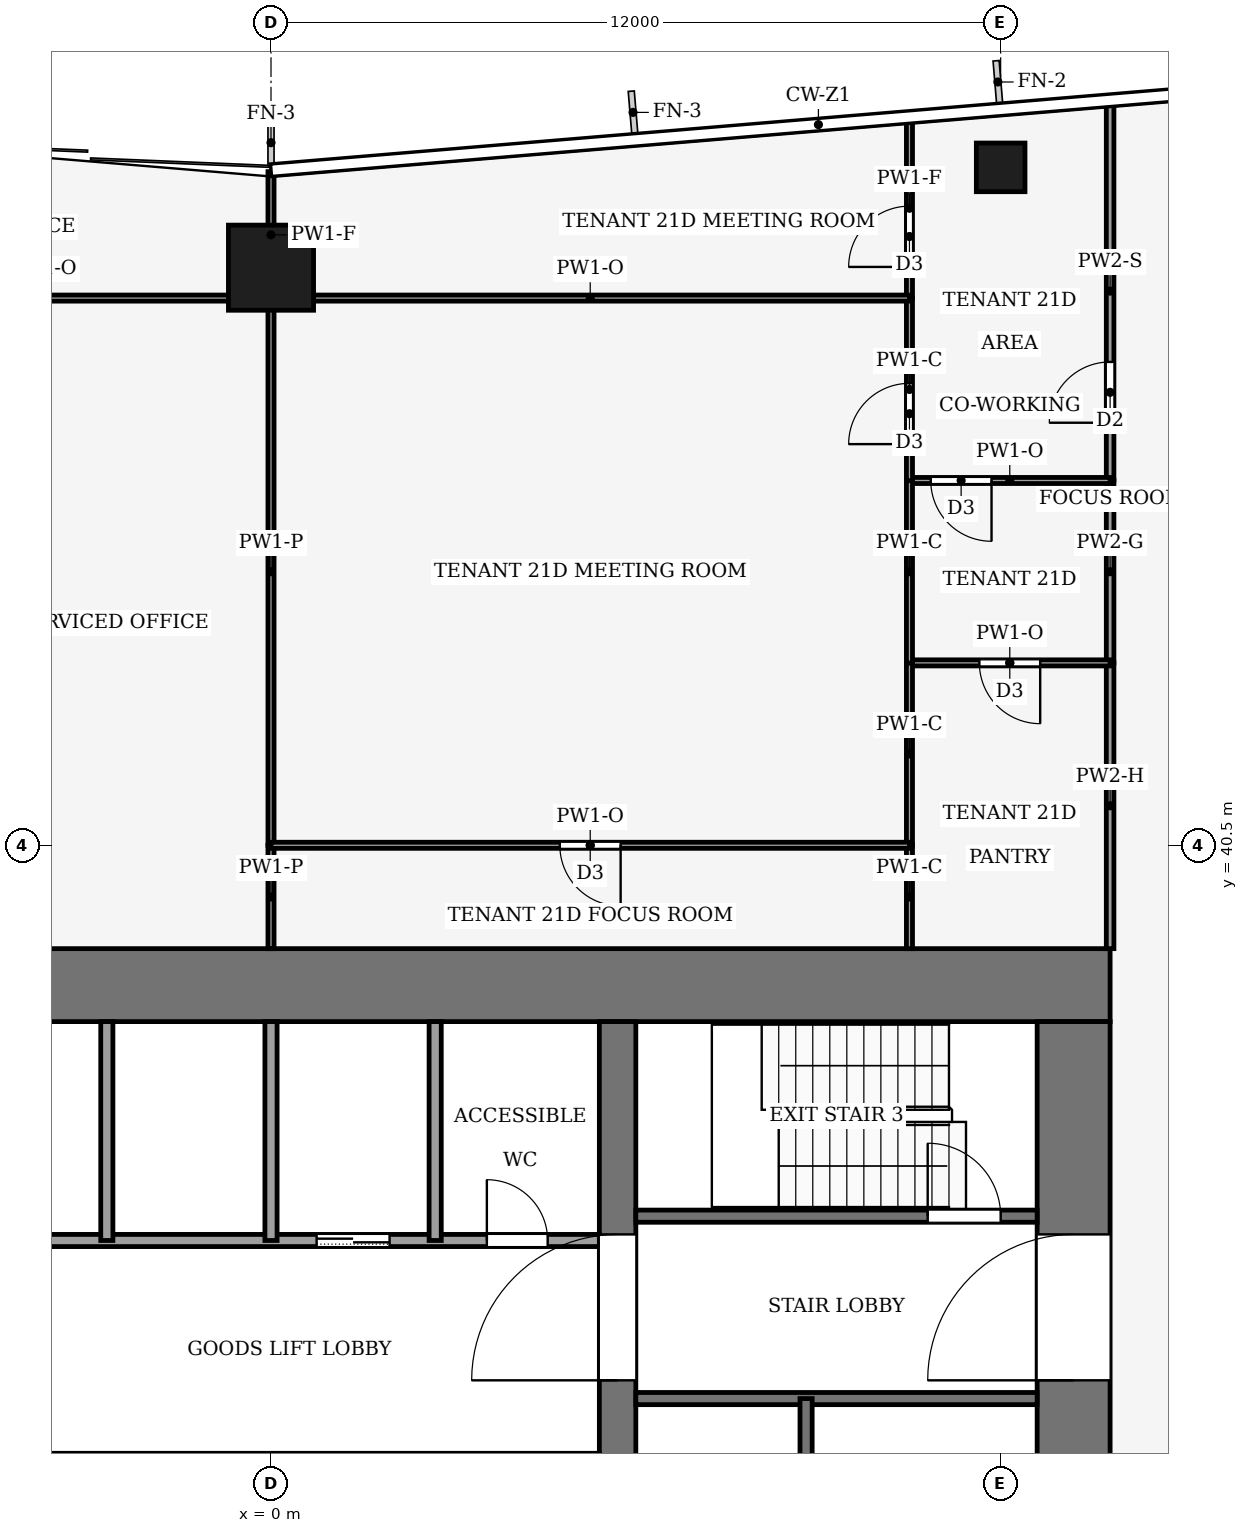
"""IFC4 building model, lengths in metres.
Left out: names, types, materials, properties, quantities, classifications, styles, units other than length and angle.
Written with IfcOpenShell. Run it as: python <this file> out.ifc"""

import sys

from ifc_helpers import new_model, si_unit, direction, frame, frame_2d, origin, origin_2d, place, context, subcontext, project, spatial, rectangle, hollow_rectangle, extrude, element, fill, save


model = new_model("IFC4")
c1 = context("Model", 3, precision=1e-05, world=origin(), true_north=direction((0.0, 1.0)))
c2 = subcontext(c1, "Body", "Model", "MODEL_VIEW")
j1 = project(units=[si_unit("LENGTHUNIT", "METRE"), si_unit("PLANEANGLEUNIT", "RADIAN")], contexts=[c1])
p1 = place(None, origin())
s1 = spatial("IfcSite", under=j1, at=p1, CompositionType="ELEMENT")
p2 = place(p1, origin())
s2 = spatial("IfcBuilding", under=s1, at=p2, CompositionType="ELEMENT")
p3 = place(p2, frame((0.0, 0.0, 94.0)))
s3 = spatial("IfcBuildingStorey", under=s2, at=p3, CompositionType="ELEMENT", Elevation=94.0)
p4 = place(p3, frame((-13.8, 38.2, -0.13), z_axis=(0.0, 0.0, 1.0), x_axis=(1.0, 0.0, 0.0)))
e1 = element("IfcWall", 1, at=p4, inside=s3, PredefinedType="SHEAR", context=c2, shape_type="SweptSolid", body=[
    extrude(rectangle(XDim=27.6, YDim=1.2, at=frame_2d((13.8, 0.0))), origin(), (0.0, 0.0, 1.0), 4.0),
])
p5 = place(p3, frame((13.2, 18.4, -0.13), z_axis=(0.0, 0.0, 1.0), x_axis=(0.0, 1.0, 0.0)))
e2 = element("IfcWall", 2, at=p5, inside=s3, PredefinedType="SHEAR", context=c2, shape_type="SweptSolid", body=[
    extrude(rectangle(XDim=19.2, YDim=1.2, at=frame_2d((9.6, 0.0))), origin(), (0.0, 0.0, 1.0), 4.0),
])
p6 = place(p5, frame((2.8, 0.0, 0.13)))
e3 = element("IfcOpeningElement", 3, at=p6, cuts=e2, PredefinedType="OPENING", context=c2, shape_type="SweptSolid", body=[
    extrude(rectangle(XDim=2.4, YDim=2.4, at=frame_2d((1.2, 1.2))), frame((0.0, 0.61, 0.0), z_axis=(0.0, -1.0, 0.0), x_axis=(1.0, 0.0, 0.0)), (0.0, 0.0, 1.0), 1.22),
])
p7 = place(p5, frame((13.3, 0.0, 0.13)))
e4 = element("IfcOpeningElement", 4, at=p7, cuts=e2, PredefinedType="OPENING", context=c2, shape_type="SweptSolid", body=[
    extrude(rectangle(XDim=2.4, YDim=2.4, at=frame_2d((1.2, 1.2))), frame((0.0, 0.61, 0.0), z_axis=(0.0, -1.0, 0.0), x_axis=(1.0, 0.0, 0.0)), (0.0, 0.0, 1.0), 1.22),
])
p8 = place(p3, frame((5.7, 18.4, -0.13), z_axis=(0.0, 0.0, 1.0), x_axis=(0.0, 1.0, 0.0)))
e5 = element("IfcWall", 5, at=p8, inside=s3, PredefinedType="SHEAR", context=c2, shape_type="SweptSolid", body=[
    extrude(rectangle(XDim=19.2, YDim=0.6, at=frame_2d((9.6, 0.0))), origin(), (0.0, 0.0, 1.0), 4.0),
])
p9 = place(p8, frame((8.35, 0.0, 0.13)))
e6 = element("IfcOpeningElement", 6, at=p9, cuts=e5, PredefinedType="OPENING", context=c2, shape_type="SweptSolid", body=[
    extrude(rectangle(XDim=0.9, YDim=2.1, at=frame_2d((0.45, 1.05))), frame((0.0, 0.31, 0.0), z_axis=(0.0, -1.0, 0.0), x_axis=(1.0, 0.0, 0.0)), (0.0, 0.0, 1.0), 0.62),
])
p10 = place(p8, frame((13.3, 0.0, 0.13)))
e7 = element("IfcOpeningElement", 7, at=p10, cuts=e5, PredefinedType="OPENING", context=c2, shape_type="SweptSolid", body=[
    extrude(rectangle(XDim=2.4, YDim=2.4, at=frame_2d((1.2, 1.2))), frame((0.0, 0.31, 0.0), z_axis=(0.0, -1.0, 0.0), x_axis=(1.0, 0.0, 0.0)), (0.0, 0.0, 1.0), 0.62),
])
p11 = place(p3, frame((0.0, 50.0, 0.0), z_axis=(0.0, 0.0, 1.0), x_axis=(1.0, 0.0, 0.0)))
e8 = element("IfcColumn", 8, at=p11, inside=s3, PredefinedType="COLUMN", context=c2, shape_type="SweptSolid", body=[
    extrude(hollow_rectangle(XDim=1.4, YDim=1.4, WallThickness=0.08, at=origin_2d()), origin(), (0.0, 0.0, 1.0), 4.0),
])
p12 = place(p3, frame((12.0, 51.65, 0.0), z_axis=(0.0, 0.0, 1.0), x_axis=(1.0, 0.0, 0.0)))
e9 = element("IfcColumn", 9, at=p12, inside=s3, PredefinedType="COLUMN", context=c2, shape_type="SweptSolid", body=[
    extrude(hollow_rectangle(XDim=0.8, YDim=0.8, WallThickness=0.04, at=origin_2d()), origin(), (0.0, 0.0, 1.0), 4.0),
])
p13 = place(p3, frame((6.0, 31.4, 0.0), z_axis=(0.0, 0.0, 1.0), x_axis=(1.0, 0.0, 0.0)))
e10 = element("IfcWall", 10, at=p13, inside=s3, PredefinedType="PARTITIONING", context=c2, shape_type="SweptSolid", body=[
    extrude(rectangle(XDim=6.6, YDim=0.2, at=frame_2d((3.3, 0.0))), origin(), (0.0, 0.0, 1.0), 3.87),
])
p14 = place(p3, frame((-5.4, 34.0, 0.0), z_axis=(0.0, 0.0, 1.0), x_axis=(1.0, 0.0, 0.0)))
e11 = element("IfcWall", 11, at=p14, inside=s3, PredefinedType="PARTITIONING", context=c2, shape_type="SweptSolid", body=[
    extrude(rectangle(XDim=10.8, YDim=0.2, at=frame_2d((5.4, 0.0))), origin(), (0.0, 0.0, 1.0), 3.87),
])
p15 = place(p14, frame((6.15, 0.0, 0.0)))
e12 = element("IfcOpeningElement", 12, at=p15, cuts=e11, PredefinedType="OPENING", context=c2, shape_type="SweptSolid", body=[
    extrude(rectangle(XDim=1.2, YDim=2.2, at=frame_2d((0.6, 1.1))), frame((0.0, 0.11, 0.0), z_axis=(0.0, -1.0, 0.0), x_axis=(1.0, 0.0, 0.0)), (0.0, 0.0, 1.0), 0.22),
])
p16 = place(p14, frame((8.95, 0.0, 0.0)))
e13 = element("IfcOpeningElement", 13, at=p16, cuts=e11, PredefinedType="OPENING", context=c2, shape_type="SweptSolid", body=[
    extrude(rectangle(XDim=1.0, YDim=2.1, at=frame_2d((0.5, 1.05))), frame((0.0, 0.11, 0.0), z_axis=(0.0, -1.0, 0.0), x_axis=(1.0, 0.0, 0.0)), (0.0, 0.0, 1.0), 0.22),
])
p17 = place(p3, frame((6.0, 34.4, 0.0), z_axis=(0.0, 0.0, 1.0), x_axis=(1.0, 0.0, 0.0)))
e14 = element("IfcWall", 14, at=p17, inside=s3, PredefinedType="PARTITIONING", context=c2, shape_type="SweptSolid", body=[
    extrude(rectangle(XDim=6.6, YDim=0.2, at=frame_2d((3.3, 0.0))), origin(), (0.0, 0.0, 1.0), 3.87),
])
p18 = place(p17, frame((4.8, 0.0, 0.0)))
e15 = element("IfcOpeningElement", 15, at=p18, cuts=e14, PredefinedType="OPENING", context=c2, shape_type="SweptSolid", body=[
    extrude(rectangle(XDim=1.2, YDim=2.2, at=frame_2d((0.6, 1.1))), frame((0.0, 0.11, 0.0), z_axis=(0.0, -1.0, 0.0), x_axis=(1.0, 0.0, 0.0)), (0.0, 0.0, 1.0), 0.22),
])
for number, where, z_axis, x_axis in (
    (16, (-2.7, 34.0, 0.0), (0.0, 0.0, 1.0), (0.0, 1.0, 0.0)),
    (17, (0.0, 34.0, 0.0), (0.0, 0.0, 1.0), (0.0, 1.0, 0.0)),
    (18, (2.7, 34.0, 0.0), (0.0, 0.0, 1.0), (0.0, 1.0, 0.0)),
):
    element("IfcWall", number, at=place(p3, frame(where, z_axis=z_axis, x_axis=x_axis)), inside=s3, PredefinedType="PARTITIONING", context=c2, shape_type="SweptSolid", body=[
        extrude(rectangle(XDim=3.6, YDim=0.2, at=frame_2d((1.8, 0.0))), origin(), (0.0, 0.0, 1.0), 3.87),
    ])
p19 = place(p3, frame((8.8, 24.0, 0.0), z_axis=(0.0, 0.0, 1.0), x_axis=(0.0, 1.0, 0.0)))
e19 = element("IfcWall", 19, at=p19, inside=s3, PredefinedType="PARTITIONING", context=c2, shape_type="SweptSolid", body=[
    extrude(rectangle(XDim=7.4, YDim=0.2, at=frame_2d((3.7, 0.0))), origin(), (0.0, 0.0, 1.0), 3.87),
])
p20 = place(p3, frame((13.8, 43.5, 0.0), z_axis=(0.0, 0.0, 1.0), x_axis=(0.0, -1.0, 0.0)))
e20 = element("IfcWall", 20, at=p20, inside=s3, PredefinedType="PARTITIONING", context=c2, shape_type="SweptSolid", body=[
    extrude(rectangle(XDim=4.7, YDim=0.125, at=frame_2d((2.35, 0.0))), origin(), (0.0, 0.0, 1.0), 3.14),
])
p21 = place(p3, frame((13.8, 46.5, 0.0), z_axis=(0.0, 0.0, 1.0), x_axis=(0.0, -1.0, 0.0)))
e21 = element("IfcWall", 21, at=p21, inside=s3, PredefinedType="PARTITIONING", context=c2, shape_type="SweptSolid", body=[
    extrude(rectangle(XDim=3.0, YDim=0.125, at=frame_2d((1.5, 0.0))), origin(), (0.0, 0.0, 1.0), 3.87),
])
p22 = place(p3, frame((13.8, 46.5, 0.0), z_axis=(0.0, 0.0, 1.0), x_axis=(0.0, 1.0, 0.0)))
e22 = element("IfcWall", 22, at=p22, inside=s3, PredefinedType="PARTITIONING", context=c2, shape_type="SweptSolid", body=[
    extrude(rectangle(XDim=6.23, YDim=0.125, at=frame_2d((3.115, 0.0))), origin(), (0.0, 0.0, 1.0), 3.04),
])
p23 = place(p22, frame((0.95, 0.0, 0.0)))
e23 = element("IfcOpeningElement", 23, at=p23, cuts=e22, PredefinedType="OPENING", context=c2, shape_type="SweptSolid", body=[
    extrude(rectangle(XDim=1.0, YDim=2.1, at=frame_2d((0.5, 1.05))), frame((0.0, 0.073, 0.0), z_axis=(0.0, -1.0, 0.0), x_axis=(1.0, 0.0, 0.0)), (0.0, 0.0, 1.0), 0.145),
])
p24 = place(p3, frame((-7.5, 49.5, 0.0), z_axis=(0.0, 0.0, 1.0), x_axis=(1.0, 0.0, 0.0)))
e24 = element("IfcWall", 24, at=p24, inside=s3, PredefinedType="PARTITIONING", context=c2, shape_type="SweptSolid", body=[
    extrude(rectangle(XDim=7.5, YDim=0.1, at=frame_2d((3.75, 0.0))), origin(), (0.0, 0.0, 1.0), 3.39),
])
p25 = place(p24, frame((2.85, 0.0, 0.0)))
e25 = element("IfcOpeningElement", 25, at=p25, cuts=e24, PredefinedType="OPENING", context=c2, shape_type="SweptSolid", body=[
    extrude(rectangle(XDim=1.0, YDim=2.1, at=frame_2d((0.5, 1.05))), frame((0.0, 0.06, 0.0), z_axis=(0.0, -1.0, 0.0), x_axis=(1.0, 0.0, 0.0)), (0.0, 0.0, 1.0), 0.12),
])
p26 = place(p3, frame((0.0, 38.8, 0.0), z_axis=(0.0, 0.0, 1.0), x_axis=(0.0, 1.0, 0.0)))
e26 = element("IfcWall", 26, at=p26, inside=s3, PredefinedType="PARTITIONING", context=c2, shape_type="SweptSolid", body=[
    extrude(rectangle(XDim=1.7, YDim=0.1, at=frame_2d((0.85, 0.0))), origin(), (0.0, 0.0, 1.0), 3.44),
])
p27 = place(p3, frame((0.0, 40.5, 0.0), z_axis=(0.0, 0.0, 1.0), x_axis=(0.0, 1.0, 0.0)))
e27 = element("IfcWall", 27, at=p27, inside=s3, PredefinedType="PARTITIONING", context=c2, shape_type="SweptSolid", body=[
    extrude(rectangle(XDim=9.0, YDim=0.1, at=frame_2d((4.5, 0.0))), origin(), (0.0, 0.0, 1.0), 3.44),
])
p28 = place(p3, frame((0.0, 49.5, 0.0), z_axis=(0.0, 0.0, 1.0), x_axis=(0.0, 1.0, 0.0)))
e28 = element("IfcWall", 28, at=p28, inside=s3, PredefinedType="PARTITIONING", context=c2, shape_type="SweptSolid", body=[
    extrude(rectangle(XDim=2.08, YDim=0.1, at=frame_2d((1.04, 0.0))), origin(), (0.0, 0.0, 1.0), 3.04),
])
p29 = place(p3, frame((13.8, 43.5, 0.0), z_axis=(0.0, 0.0, 1.0), x_axis=(-1.0, 0.0, 0.0)))
e29 = element("IfcWall", 29, at=p29, inside=s3, PredefinedType="PARTITIONING", context=c2, shape_type="SweptSolid", body=[
    extrude(rectangle(XDim=3.3, YDim=0.1, at=frame_2d((1.65, 0.0))), origin(), (0.0, 0.0, 1.0), 3.39),
])
p30 = place(p29, frame((1.15, 0.0, 0.0)))
e30 = element("IfcOpeningElement", 30, at=p30, cuts=e29, PredefinedType="OPENING", context=c2, shape_type="SweptSolid", body=[
    extrude(rectangle(XDim=1.0, YDim=2.1, at=frame_2d((0.5, 1.05))), frame((0.0, 0.06, 0.0), z_axis=(0.0, -1.0, 0.0), x_axis=(1.0, 0.0, 0.0)), (0.0, 0.0, 1.0), 0.12),
])
p31 = place(p3, frame((10.5, 40.5, 0.0), z_axis=(0.0, 0.0, 1.0), x_axis=(0.0, -1.0, 0.0)))
e31 = element("IfcWall", 31, at=p31, inside=s3, PredefinedType="PARTITIONING", context=c2, shape_type="SweptSolid", body=[
    extrude(rectangle(XDim=1.7, YDim=0.1, at=frame_2d((0.85, 0.0))), origin(), (0.0, 0.0, 1.0), 3.87),
])
p32 = place(p3, frame((10.5, 43.504, 0.0), z_axis=(0.0, 0.0, 1.0), x_axis=(0.0, -1.0, 0.0)))
e32 = element("IfcWall", 32, at=p32, inside=s3, PredefinedType="PARTITIONING", context=c2, shape_type="SweptSolid", body=[
    extrude(rectangle(XDim=3.004, YDim=0.1, at=frame_2d((1.502, 0.0))), origin(), (0.0, 0.0, 1.0), 3.87),
])
p33 = place(p3, frame((13.8, 46.5, 0.0), z_axis=(0.0, 0.0, 1.0), x_axis=(-1.0, 0.0, 0.0)))
e33 = element("IfcWall", 33, at=p33, inside=s3, PredefinedType="PARTITIONING", context=c2, shape_type="SweptSolid", body=[
    extrude(rectangle(XDim=3.3, YDim=0.1, at=frame_2d((1.65, 0.0))), origin(), (0.0, 0.0, 1.0), 3.39),
])
p34 = place(p33, frame((1.95, 0.0, 0.0)))
e34 = element("IfcOpeningElement", 34, at=p34, cuts=e33, PredefinedType="OPENING", context=c2, shape_type="SweptSolid", body=[
    extrude(rectangle(XDim=1.0, YDim=2.1, at=frame_2d((0.5, 1.05))), frame((0.0, 0.06, 0.0), z_axis=(0.0, -1.0, 0.0), x_axis=(1.0, 0.0, 0.0)), (0.0, 0.0, 1.0), 0.12),
])
p35 = place(p3, frame((10.5, 46.504, 0.0), z_axis=(0.0, 0.0, 1.0), x_axis=(0.0, -1.0, 0.0)))
e35 = element("IfcWall", 35, at=p35, inside=s3, PredefinedType="PARTITIONING", context=c2, shape_type="SweptSolid", body=[
    extrude(rectangle(XDim=3.008, YDim=0.1, at=frame_2d((1.504, 0.0))), origin(), (0.0, 0.0, 1.0), 3.87),
])
p36 = place(p3, frame((10.5, 46.496, 0.0), z_axis=(0.0, 0.0, 1.0), x_axis=(0.0, 1.0, 0.0)))
e36 = element("IfcWall", 36, at=p36, inside=s3, PredefinedType="PARTITIONING", context=c2, shape_type="SweptSolid", body=[
    extrude(rectangle(XDim=3.004, YDim=0.1, at=frame_2d((1.502, 0.0))), origin(), (0.0, 0.0, 1.0), 3.87),
])
p37 = place(p36, frame((0.602, 0.0, 0.0)))
e37 = element("IfcOpeningElement", 37, at=p37, cuts=e36, PredefinedType="OPENING", context=c2, shape_type="SweptSolid", body=[
    extrude(rectangle(XDim=1.0, YDim=2.1, at=frame_2d((0.5, 1.05))), frame((0.0, 0.06, 0.0), z_axis=(0.0, -1.0, 0.0), x_axis=(1.0, 0.0, 0.0)), (0.0, 0.0, 1.0), 0.12),
])
p38 = place(p3, frame((10.5, 49.5, 0.0), z_axis=(0.0, 0.0, 1.0), x_axis=(0.0, 1.0, 0.0)))
e38 = element("IfcWall", 38, at=p38, inside=s3, PredefinedType="PARTITIONING", context=c2, shape_type="SweptSolid", body=[
    extrude(rectangle(XDim=2.955, YDim=0.1, at=frame_2d((1.478, 0.0))), origin(), (0.0, 0.0, 1.0), 3.04),
])
p39 = place(p38, frame((0.512, 0.0, 0.0)))
e39 = element("IfcOpeningElement", 39, at=p39, cuts=e38, PredefinedType="OPENING", context=c2, shape_type="SweptSolid", body=[
    extrude(rectangle(XDim=1.0, YDim=2.1, at=frame_2d((0.5, 1.05))), frame((0.0, 0.06, 0.0), z_axis=(0.0, -1.0, 0.0), x_axis=(1.0, 0.0, 0.0)), (0.0, 0.0, 1.0), 0.12),
])
p40 = place(p3, frame((10.5, 40.5, 0.0), z_axis=(0.0, 0.0, 1.0), x_axis=(-1.0, 0.0, 0.0)))
e40 = element("IfcWall", 40, at=p40, inside=s3, PredefinedType="PARTITIONING", context=c2, shape_type="SweptSolid", body=[
    extrude(rectangle(XDim=10.5, YDim=0.1, at=frame_2d((5.25, 0.0))), origin(), (0.0, 0.0, 1.0), 3.39),
])
p41 = place(p40, frame((4.75, 0.0, 0.0)))
e41 = element("IfcOpeningElement", 41, at=p41, cuts=e40, PredefinedType="OPENING", context=c2, shape_type="SweptSolid", body=[
    extrude(rectangle(XDim=1.0, YDim=2.1, at=frame_2d((0.5, 1.05))), frame((0.0, 0.06, 0.0), z_axis=(0.0, -1.0, 0.0), x_axis=(1.0, 0.0, 0.0)), (0.0, 0.0, 1.0), 0.12),
])
p42 = place(p3, frame((10.5, 49.5, 0.0), z_axis=(0.0, 0.0, 1.0), x_axis=(-1.0, 0.0, 0.0)))
e42 = element("IfcWall", 42, at=p42, inside=s3, PredefinedType="PARTITIONING", context=c2, shape_type="SweptSolid", body=[
    extrude(rectangle(XDim=10.5, YDim=0.1, at=frame_2d((5.25, 0.0))), origin(), (0.0, 0.0, 1.0), 3.39),
])
p43 = place(p15, origin())
e43 = element("IfcDoor", 43, at=p43, inside=s3, OperationType="SLIDING_TO_LEFT", PredefinedType="DOOR", context=c2, shape_type="SweptSolid", body=[
    extrude(rectangle(XDim=1.2, YDim=2.2, at=frame_2d((0.6, 1.1))), frame((0.0, 0.025, 0.0), z_axis=(0.0, -1.0, 0.0), x_axis=(1.0, 0.0, 0.0)), (0.0, 0.0, 1.0), 0.05),
])
fill(e12, e43)
p44 = place(p16, origin())
e44 = element("IfcDoor", 44, at=p44, inside=s3, OperationType="SINGLE_SWING_LEFT", PredefinedType="DOOR", context=c2, shape_type="SweptSolid", body=[
    extrude(rectangle(XDim=1.0, YDim=2.1, at=frame_2d((0.5, 1.05))), frame((0.0, 0.025, 0.0), z_axis=(0.0, -1.0, 0.0), x_axis=(1.0, 0.0, 0.0)), (0.0, 0.0, 1.0), 0.05),
])
fill(e13, e44)
p45 = place(p18, origin())
e45 = element("IfcDoor", 45, at=p45, inside=s3, OperationType="SINGLE_SWING_RIGHT", PredefinedType="DOOR", context=c2, shape_type="SweptSolid", body=[
    extrude(rectangle(XDim=1.2, YDim=2.2, at=frame_2d((0.6, 1.1))), frame((0.0, 0.025, 0.0), z_axis=(0.0, -1.0, 0.0), x_axis=(1.0, 0.0, 0.0)), (0.0, 0.0, 1.0), 0.05),
])
fill(e15, e45)
p46 = place(p10, origin())
e46 = element("IfcDoor", 46, at=p46, inside=s3, OperationType="DOUBLE_DOOR_SINGLE_SWING", PredefinedType="DOOR", context=c2, shape_type="SweptSolid", body=[
    extrude(rectangle(XDim=2.4, YDim=2.4, at=frame_2d((1.2, 1.2))), frame((0.0, 0.025, 0.0), z_axis=(0.0, -1.0, 0.0), x_axis=(1.0, 0.0, 0.0)), (0.0, 0.0, 1.0), 0.05),
])
fill(e7, e46)
p47 = place(p7, origin())
e47 = element("IfcDoor", 47, at=p47, inside=s3, OperationType="DOUBLE_DOOR_SINGLE_SWING", PredefinedType="DOOR", context=c2, shape_type="SweptSolid", body=[
    extrude(rectangle(XDim=2.4, YDim=2.4, at=frame_2d((1.2, 1.2))), frame((0.0, 0.025, 0.0), z_axis=(0.0, -1.0, 0.0), x_axis=(1.0, 0.0, 0.0)), (0.0, 0.0, 1.0), 0.05),
])
fill(e4, e47)
p48 = place(p23, origin())
e48 = element("IfcDoor", 48, at=p48, inside=s3, OperationType="SINGLE_SWING_LEFT", PredefinedType="DOOR", context=c2, shape_type="SweptSolid", body=[
    extrude(rectangle(XDim=1.0, YDim=2.1, at=frame_2d((0.5, 1.05))), frame((0.0, 0.025, 0.0), z_axis=(0.0, -1.0, 0.0), x_axis=(1.0, 0.0, 0.0)), (0.0, 0.0, 1.0), 0.05),
])
fill(e23, e48)
p49 = place(p30, origin())
e49 = element("IfcDoor", 49, at=p49, inside=s3, OperationType="SINGLE_SWING_RIGHT", PredefinedType="DOOR", context=c2, shape_type="SweptSolid", body=[
    extrude(rectangle(XDim=1.0, YDim=2.1, at=frame_2d((0.5, 1.05))), frame((0.0, 0.025, 0.0), z_axis=(0.0, -1.0, 0.0), x_axis=(1.0, 0.0, 0.0)), (0.0, 0.0, 1.0), 0.05),
])
fill(e30, e49)
p50 = place(p34, origin())
e50 = element("IfcDoor", 50, at=p50, inside=s3, OperationType="SINGLE_SWING_RIGHT", PredefinedType="DOOR", context=c2, shape_type="SweptSolid", body=[
    extrude(rectangle(XDim=1.0, YDim=2.1, at=frame_2d((0.5, 1.05))), frame((0.0, 0.025, 0.0), z_axis=(0.0, -1.0, 0.0), x_axis=(1.0, 0.0, 0.0)), (0.0, 0.0, 1.0), 0.05),
])
fill(e34, e50)
p51 = place(p37, origin())
e51 = element("IfcDoor", 51, at=p51, inside=s3, OperationType="SINGLE_SWING_LEFT", PredefinedType="DOOR", context=c2, shape_type="SweptSolid", body=[
    extrude(rectangle(XDim=1.0, YDim=2.1, at=frame_2d((0.5, 1.05))), frame((0.0, 0.025, 0.0), z_axis=(0.0, -1.0, 0.0), x_axis=(1.0, 0.0, 0.0)), (0.0, 0.0, 1.0), 0.05),
])
fill(e37, e51)
p52 = place(p39, origin())
e52 = element("IfcDoor", 52, at=p52, inside=s3, OperationType="SINGLE_SWING_LEFT", PredefinedType="DOOR", context=c2, shape_type="SweptSolid", body=[
    extrude(rectangle(XDim=1.0, YDim=2.1, at=frame_2d((0.5, 1.05))), frame((0.0, 0.025, 0.0), z_axis=(0.0, -1.0, 0.0), x_axis=(1.0, 0.0, 0.0)), (0.0, 0.0, 1.0), 0.05),
])
fill(e39, e52)
p53 = place(p41, origin())
e53 = element("IfcDoor", 53, at=p53, inside=s3, OperationType="SINGLE_SWING_RIGHT", PredefinedType="DOOR", context=c2, shape_type="SweptSolid", body=[
    extrude(rectangle(XDim=1.0, YDim=2.1, at=frame_2d((0.5, 1.05))), frame((0.0, 0.025, 0.0), z_axis=(0.0, -1.0, 0.0), x_axis=(1.0, 0.0, 0.0)), (0.0, 0.0, 1.0), 0.05),
])
fill(e41, e53)
save(model, sys.argv[1])
